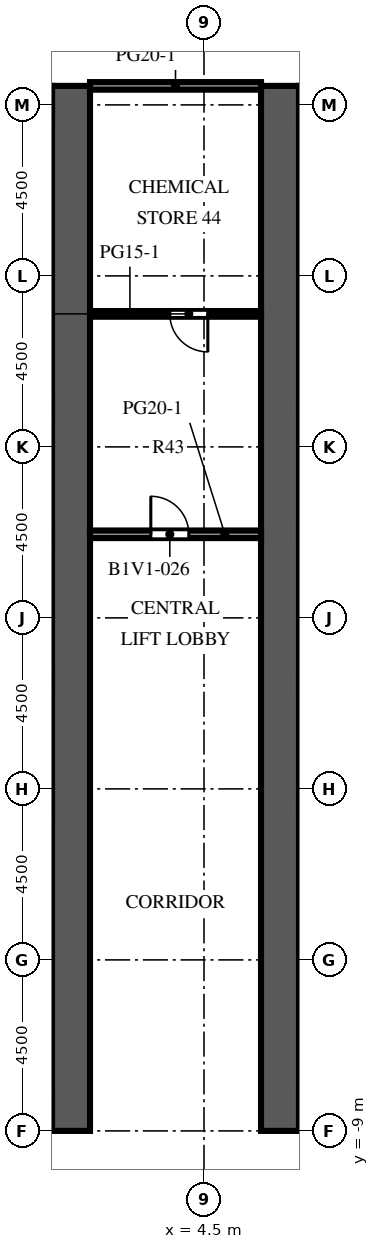
"""IFC4 building model, lengths in metres.
Left out: names, types, materials, properties, quantities, classifications, styles, units other than length and angle.
Written with IfcOpenShell. Run it as: python <this file> out.ifc"""

import sys

from ifc_helpers import new_model, si_unit, direction, frame, frame_2d, origin, place, context, subcontext, project, spatial, rectangle, extrude, element, fill, save


model = new_model("IFC4")
c1 = context("Model", 3, precision=1e-05, world=origin(), true_north=direction((0.0, 1.0)))
c2 = subcontext(c1, "Body", "Model", "MODEL_VIEW")
j1 = project(units=[si_unit("LENGTHUNIT", "METRE"), si_unit("PLANEANGLEUNIT", "RADIAN")], contexts=[c1])
p1 = place(None, origin())
s1 = spatial("IfcSite", under=j1, at=p1, CompositionType="ELEMENT")
p2 = place(p1, origin())
s2 = spatial("IfcBuilding", under=s1, at=p2, CompositionType="ELEMENT")
p3 = place(p2, frame((0.0, 0.0, 23.6)))
s3 = spatial("IfcBuildingStorey", under=s2, at=p3, CompositionType="ELEMENT", Elevation=23.6)
p4 = place(p3, frame((1.0, -9.0, 0.0), z_axis=(0.0, 0.0, 1.0), x_axis=(0.0, 1.0, 0.0)))
e1 = element("IfcWall", 1, at=p4, inside=s3, PredefinedType="SHEAR", context=c2, shape_type="SweptSolid", body=[
    extrude(rectangle(XDim=27.5, YDim=1.0, at=frame_2d((13.75, 0.0))), origin(), (0.0, 0.0, 1.0), 4.1),
])
p5 = place(p4, frame((12.55, 0.0, 0.0)))
e2 = element("IfcOpeningElement", 2, at=p5, cuts=e1, PredefinedType="OPENING", context=c2, shape_type="SweptSolid", body=[
    extrude(rectangle(XDim=2.4, YDim=2.4, at=frame_2d((1.2, 1.2))), frame((0.0, 0.51, 0.0), z_axis=(0.0, -1.0, 0.0), x_axis=(1.0, 0.0, 0.0)), (0.0, 0.0, 1.0), 1.02),
])
p6 = place(p4, frame((3.955, 0.0, 0.0)))
e3 = element("IfcOpeningElement", 3, at=p6, cuts=e1, PredefinedType="OPENING", context=c2, shape_type="SweptSolid", body=[
    extrude(rectangle(XDim=0.905, YDim=2.1, at=frame_2d((0.453, 1.05))), frame((0.0, 0.51, 0.0), z_axis=(0.0, -1.0, 0.0), x_axis=(1.0, 0.0, 0.0)), (0.0, 0.0, 1.0), 1.02),
])
p7 = place(p4, frame((23.363, 0.0, 0.0)))
e4 = element("IfcOpeningElement", 4, at=p7, cuts=e1, PredefinedType="OPENING", context=c2, shape_type="SweptSolid", body=[
    extrude(rectangle(XDim=1.2, YDim=2.1, at=frame_2d((0.6, 1.05))), frame((0.0, 0.51, 0.0), z_axis=(0.0, -1.0, 0.0), x_axis=(1.0, 0.0, 0.0)), (0.0, 0.0, 1.0), 1.02),
])
p8 = place(p3, frame((6.5, -9.0, 0.0), z_axis=(0.0, 0.0, 1.0), x_axis=(0.0, 1.0, 0.0)))
e5 = element("IfcWall", 5, at=p8, inside=s3, PredefinedType="SHEAR", context=c2, shape_type="SweptSolid", body=[
    extrude(rectangle(XDim=27.5, YDim=1.0, at=frame_2d((13.75, 0.0))), origin(), (0.0, 0.0, 1.0), 4.1),
])
p9 = place(p8, frame((12.55, 0.0, 0.0)))
e6 = element("IfcOpeningElement", 6, at=p9, cuts=e5, PredefinedType="OPENING", context=c2, shape_type="SweptSolid", body=[
    extrude(rectangle(XDim=2.4, YDim=2.4, at=frame_2d((1.2, 1.2))), frame((0.0, 0.51, 0.0), z_axis=(0.0, -1.0, 0.0), x_axis=(1.0, 0.0, 0.0)), (0.0, 0.0, 1.0), 1.02),
])
p10 = place(p8, frame((3.955, 0.0, 0.0)))
e7 = element("IfcOpeningElement", 7, at=p10, cuts=e5, PredefinedType="OPENING", context=c2, shape_type="SweptSolid", body=[
    extrude(rectangle(XDim=0.905, YDim=2.1, at=frame_2d((0.453, 1.05))), frame((0.0, 0.51, 0.0), z_axis=(0.0, -1.0, 0.0), x_axis=(1.0, 0.0, 0.0)), (0.0, 0.0, 1.0), 1.02),
])
p11 = place(p8, frame((23.363, 0.0, 0.0)))
e8 = element("IfcOpeningElement", 8, at=p11, cuts=e5, PredefinedType="OPENING", context=c2, shape_type="SweptSolid", body=[
    extrude(rectangle(XDim=1.2, YDim=2.1, at=frame_2d((0.6, 1.05))), frame((0.0, 0.51, 0.0), z_axis=(0.0, -1.0, 0.0), x_axis=(1.0, 0.0, 0.0)), (0.0, 0.0, 1.0), 1.02),
])
p12 = place(p3, frame((-2.445, -3.94, 0.0), z_axis=(0.0, 0.0, 1.0), x_axis=(1.0, 0.0, 0.0)))
e9 = element("IfcWall", 9, at=p12, inside=s3, PredefinedType="PARTITIONING", context=c2, shape_type="SweptSolid", body=[
    extrude(rectangle(XDim=2.945, YDim=0.1, at=frame_2d((1.473, 0.0))), origin(), (0.0, 0.0, 1.0), 3.65),
])
p13 = place(p12, frame((0.972, 0.0, 0.0)))
e10 = element("IfcOpeningElement", 10, at=p13, cuts=e9, PredefinedType="OPENING", context=c2, shape_type="SweptSolid", body=[
    extrude(rectangle(XDim=1.0, YDim=2.1, at=frame_2d((0.5, 1.05))), frame((0.0, 0.06, 0.0), z_axis=(0.0, -1.0, 0.0), x_axis=(1.0, 0.0, 0.0)), (0.0, 0.0, 1.0), 0.12),
])
p14 = place(p3, frame((7.0, 12.425, 0.0), z_axis=(0.0, 0.0, 1.0), x_axis=(1.0, 0.0, 0.0)))
e11 = element("IfcWall", 11, at=p14, inside=s3, PredefinedType="PARTITIONING", context=c2, shape_type="SweptSolid", body=[
    extrude(rectangle(XDim=1.3, YDim=0.1, at=frame_2d((0.65, 0.0))), origin(), (0.0, 0.0, 1.0), 3.65),
])
p15 = place(p14, frame((0.2, 0.0, 0.0)))
e12 = element("IfcOpeningElement", 12, at=p15, cuts=e11, PredefinedType="OPENING", context=c2, shape_type="SweptSolid", body=[
    extrude(rectangle(XDim=0.9, YDim=2.1, at=frame_2d((0.45, 1.05))), frame((0.0, 0.06, 0.0), z_axis=(0.0, -1.0, 0.0), x_axis=(1.0, 0.0, 0.0)), (0.0, 0.0, 1.0), 0.12),
])
p16 = place(p3, frame((1.5, 6.7, 0.0), z_axis=(0.0, 0.0, 1.0), x_axis=(1.0, 0.0, 0.0)))
e13 = element("IfcWall", 13, at=p16, inside=s3, PredefinedType="PARTITIONING", context=c2, shape_type="SweptSolid", body=[
    extrude(rectangle(XDim=4.5, YDim=0.2, at=frame_2d((2.25, 0.0))), origin(), (0.0, 0.0, 1.0), 3.65),
])
p17 = place(p16, frame((1.6, 0.0, 0.0)))
e14 = element("IfcOpeningElement", 14, at=p17, cuts=e13, PredefinedType="OPENING", context=c2, shape_type="SweptSolid", body=[
    extrude(rectangle(XDim=1.0, YDim=2.1, at=frame_2d((0.5, 1.05))), frame((0.0, 0.11, 0.0), z_axis=(0.0, -1.0, 0.0), x_axis=(1.0, 0.0, 0.0)), (0.0, 0.0, 1.0), 0.22),
])
p18 = place(p3, frame((1.5, 12.5, 0.0), z_axis=(0.0, 0.0, 1.0), x_axis=(1.0, 0.0, 0.0)))
e15 = element("IfcWall", 15, at=p18, inside=s3, PredefinedType="PARTITIONING", context=c2, shape_type="SweptSolid", body=[
    extrude(rectangle(XDim=4.5, YDim=0.15, at=frame_2d((2.25, 0.0))), origin(), (0.0, 0.0, 1.0), 3.65),
])
p19 = place(p18, frame((2.1, 0.0, 0.0)))
e16 = element("IfcOpeningElement", 16, at=p19, cuts=e15, PredefinedType="OPENING", context=c2, shape_type="SweptSolid", body=[
    extrude(rectangle(XDim=1.0, YDim=2.1, at=frame_2d((0.5, 1.05))), frame((0.0, 0.085, 0.0), z_axis=(0.0, -1.0, 0.0), x_axis=(1.0, 0.0, 0.0)), (0.0, 0.0, 1.0), 0.17),
])
p20 = place(p3, frame((1.5, 18.5, 0.0), z_axis=(0.0, 0.0, 1.0), x_axis=(1.0, 0.0, 0.0)))
e17 = element("IfcWall", 17, at=p20, inside=s3, PredefinedType="PARTITIONING", context=c2, shape_type="SweptSolid", body=[
    extrude(rectangle(XDim=4.5, YDim=0.2, at=frame_2d((2.25, 0.0))), origin(), (0.0, 0.0, 1.0), 3.65),
])
p21 = place(p5, origin())
e18 = element("IfcDoor", 18, at=p21, inside=s3, OperationType="DOUBLE_DOOR_DOUBLE_SWING", PredefinedType="DOOR", context=c2, shape_type="SweptSolid", body=[
    extrude(rectangle(XDim=2.4, YDim=2.4, at=frame_2d((1.2, 1.2))), frame((0.0, 0.025, 0.0), z_axis=(0.0, -1.0, 0.0), x_axis=(1.0, 0.0, 0.0)), (0.0, 0.0, 1.0), 0.05),
])
fill(e2, e18)
p22 = place(p9, origin())
e19 = element("IfcDoor", 19, at=p22, inside=s3, OperationType="DOUBLE_DOOR_DOUBLE_SWING", PredefinedType="DOOR", context=c2, shape_type="SweptSolid", body=[
    extrude(rectangle(XDim=2.4, YDim=2.4, at=frame_2d((1.2, 1.2))), frame((0.0, 0.025, 0.0), z_axis=(0.0, -1.0, 0.0), x_axis=(1.0, 0.0, 0.0)), (0.0, 0.0, 1.0), 0.05),
])
fill(e6, e19)
p23 = place(p6, origin())
e20 = element("IfcDoor", 20, at=p23, inside=s3, OperationType="SINGLE_SWING_LEFT", PredefinedType="DOOR", context=c2, shape_type="SweptSolid", body=[
    extrude(rectangle(XDim=0.905, YDim=2.1, at=frame_2d((0.453, 1.05))), frame((0.0, 0.475, 0.0), z_axis=(0.0, -1.0, 0.0), x_axis=(1.0, 0.0, 0.0)), (0.0, 0.0, 1.0), 0.05),
])
fill(e3, e20)
p24 = place(p7, origin())
e21 = element("IfcDoor", 21, at=p24, inside=s3, OperationType="SINGLE_SWING_RIGHT", PredefinedType="DOOR", context=c2, shape_type="SweptSolid", body=[
    extrude(rectangle(XDim=1.2, YDim=2.1, at=frame_2d((0.6, 1.05))), frame((0.0, 0.475, 0.0), z_axis=(0.0, -1.0, 0.0), x_axis=(1.0, 0.0, 0.0)), (0.0, 0.0, 1.0), 0.05),
])
fill(e4, e21)
p25 = place(p10, origin())
e22 = element("IfcDoor", 22, at=p25, inside=s3, OperationType="SINGLE_SWING_RIGHT", PredefinedType="DOOR", context=c2, shape_type="SweptSolid", body=[
    extrude(rectangle(XDim=0.905, YDim=2.1, at=frame_2d((0.453, 1.05))), frame((0.0, -0.425, 0.0), z_axis=(0.0, -1.0, 0.0), x_axis=(1.0, 0.0, 0.0)), (0.0, 0.0, 1.0), 0.05),
])
fill(e7, e22)
p26 = place(p11, origin())
e23 = element("IfcDoor", 23, at=p26, inside=s3, OperationType="SINGLE_SWING_LEFT", PredefinedType="DOOR", context=c2, shape_type="SweptSolid", body=[
    extrude(rectangle(XDim=1.2, YDim=2.1, at=frame_2d((0.6, 1.05))), frame((0.0, -0.425, 0.0), z_axis=(0.0, -1.0, 0.0), x_axis=(1.0, 0.0, 0.0)), (0.0, 0.0, 1.0), 0.05),
])
fill(e8, e23)
p27 = place(p17, origin())
e24 = element("IfcDoor", 24, at=p27, inside=s3, OperationType="SINGLE_SWING_LEFT", PredefinedType="DOOR", context=c2, shape_type="SweptSolid", body=[
    extrude(rectangle(XDim=1.0, YDim=2.1, at=frame_2d((0.5, 1.05))), frame((0.0, 0.025, 0.0), z_axis=(0.0, -1.0, 0.0), x_axis=(1.0, 0.0, 0.0)), (0.0, 0.0, 1.0), 0.05),
])
fill(e14, e24)
p28 = place(p19, origin())
e25 = element("IfcDoor", 25, at=p28, inside=s3, OperationType="SINGLE_SWING_RIGHT", PredefinedType="DOOR", context=c2, shape_type="SweptSolid", body=[
    extrude(rectangle(XDim=1.0, YDim=2.1, at=frame_2d((0.5, 1.05))), frame((0.0, 0.025, 0.0), z_axis=(0.0, -1.0, 0.0), x_axis=(1.0, 0.0, 0.0)), (0.0, 0.0, 1.0), 0.05),
])
fill(e16, e25)
save(model, sys.argv[1])
